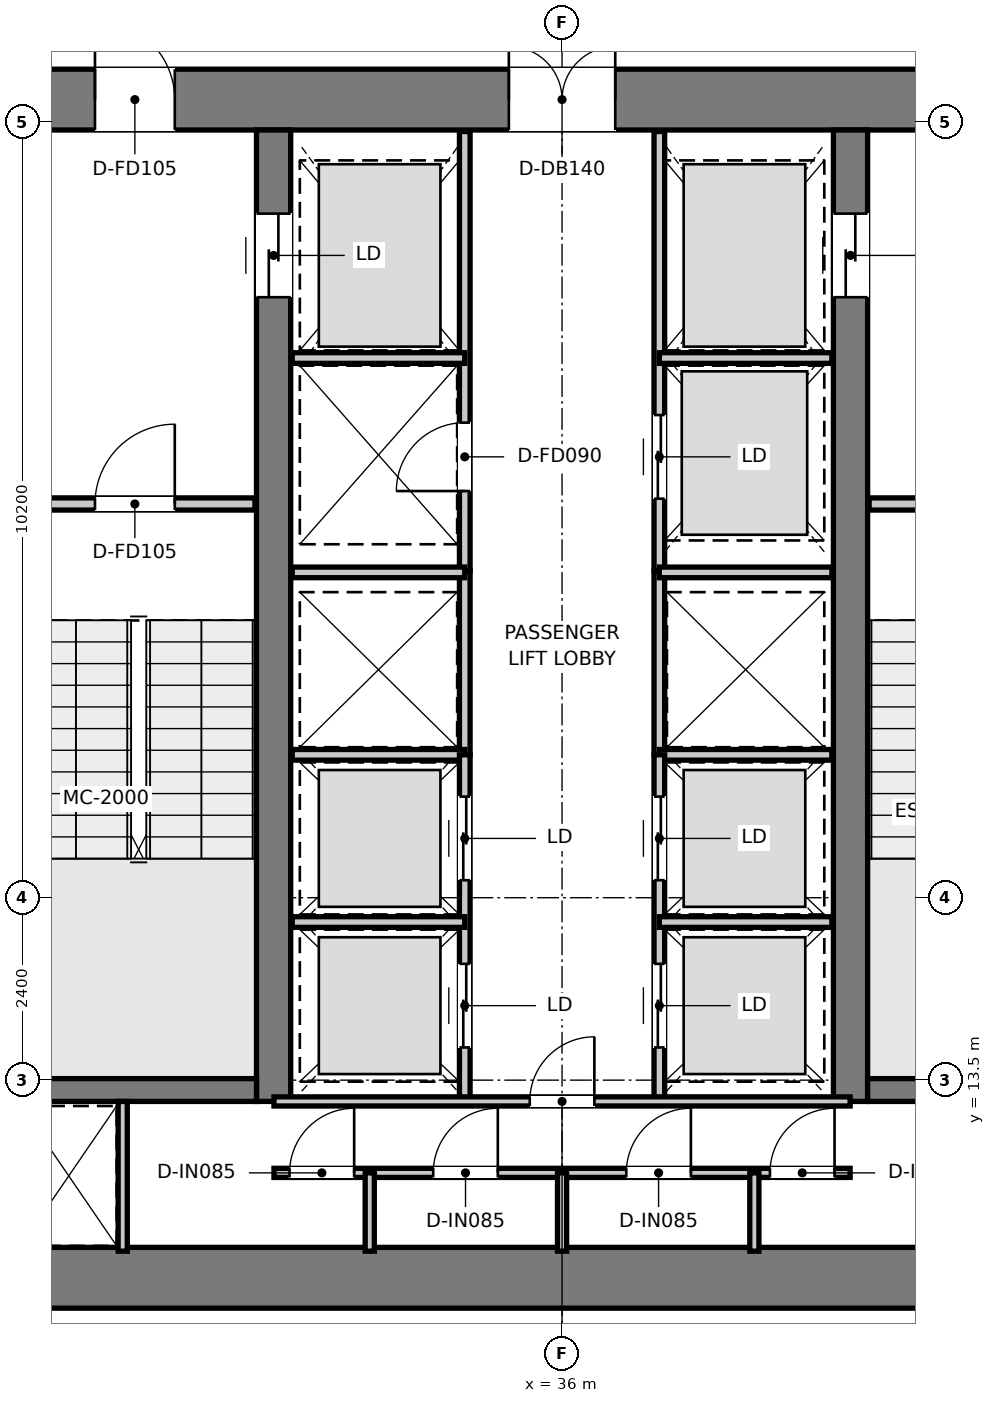
"""IFC4 building model, lengths in metres.
Left out: names, types, materials, properties, quantities, classifications, styles, units other than length and angle.
Written with IfcOpenShell. Run it as: python <this file> out.ifc"""

import sys

from ifc_helpers import new_model, si_unit, direction, frame, frame_2d, origin, place, context, subcontext, project, spatial, rectangle, extrude, element, fill, save


model = new_model("IFC4")
c1 = context("Model", 3, precision=1e-05, world=origin(), true_north=direction((0.0, 1.0)))
c2 = subcontext(c1, "Body", "Model", "MODEL_VIEW")
j1 = project(units=[si_unit("LENGTHUNIT", "METRE"), si_unit("PLANEANGLEUNIT", "RADIAN")], contexts=[c1])
p1 = place(None, origin())
s1 = spatial("IfcSite", under=j1, at=p1, CompositionType="ELEMENT")
p2 = place(p1, origin())
s2 = spatial("IfcBuilding", under=s1, at=p2, CompositionType="ELEMENT")
p3 = place(p2, frame((0.0, 0.0, 90.05)))
s3 = spatial("IfcBuildingStorey", under=s2, at=p3, CompositionType="ELEMENT", Elevation=90.05)
p4 = place(p3, frame((28.08, 10.9, 0.0), z_axis=(0.0, 0.0, 1.0), x_axis=(1.0, 0.0, 0.0)))
e1 = element("IfcWall", 1, at=p4, inside=s3, PredefinedType="SHEAR", context=c2, shape_type="SweptSolid", body=[
    extrude(rectangle(XDim=15.84, YDim=0.8, at=frame_2d((7.92, 0.0))), origin(), (0.0, 0.0, 1.0), 3.95),
])
p5 = place(p3, frame((28.08, 26.4, 0.0), z_axis=(0.0, 0.0, 1.0), x_axis=(1.0, 0.0, 0.0)))
e2 = element("IfcWall", 2, at=p5, inside=s3, PredefinedType="SHEAR", context=c2, shape_type="SweptSolid", body=[
    extrude(rectangle(XDim=15.84, YDim=0.8, at=frame_2d((7.92, 0.0))), origin(), (0.0, 0.0, 1.0), 3.95),
])
p6 = place(p5, frame((7.22, 0.0, 0.0)))
e3 = element("IfcOpeningElement", 3, at=p6, cuts=e2, PredefinedType="OPENING", context=c2, shape_type="SweptSolid", body=[
    extrude(rectangle(XDim=1.4, YDim=2.2, at=frame_2d((0.7, 1.1))), frame((0.0, 0.41, 0.0), z_axis=(0.0, -1.0, 0.0), x_axis=(1.0, 0.0, 0.0)), (0.0, 0.0, 1.0), 0.82),
])
p7 = place(p5, frame((1.775, 0.0, 0.0)))
e4 = element("IfcOpeningElement", 4, at=p7, cuts=e2, PredefinedType="OPENING", context=c2, shape_type="SweptSolid", body=[
    extrude(rectangle(XDim=1.05, YDim=2.1, at=frame_2d((0.525, 1.05))), frame((0.0, 0.41, 0.0), z_axis=(0.0, -1.0, 0.0), x_axis=(1.0, 0.0, 0.0)), (0.0, 0.0, 1.0), 0.82),
])
p8 = place(p5, frame((13.015, 0.0, 0.0)))
e5 = element("IfcOpeningElement", 5, at=p8, cuts=e2, PredefinedType="OPENING", context=c2, shape_type="SweptSolid", body=[
    extrude(rectangle(XDim=1.05, YDim=2.1, at=frame_2d((0.525, 1.05))), frame((0.0, 0.41, 0.0), z_axis=(0.0, -1.0, 0.0), x_axis=(1.0, 0.0, 0.0)), (0.0, 0.0, 1.0), 0.82),
])
p9 = place(p3, frame((32.205, 13.22, 0.0), z_axis=(0.0, 0.0, 1.0), x_axis=(0.0, 1.0, 0.0)))
e6 = element("IfcWall", 6, at=p9, inside=s3, PredefinedType="SHEAR", context=c2, shape_type="SweptSolid", body=[
    extrude(rectangle(XDim=12.78, YDim=0.45, at=frame_2d((6.39, 0.0))), origin(), (0.0, 0.0, 1.0), 3.95),
])
p10 = place(p9, frame((10.58, 0.0, 0.0)))
e7 = element("IfcOpeningElement", 7, at=p10, cuts=e6, PredefinedType="OPENING", context=c2, shape_type="SweptSolid", body=[
    extrude(rectangle(XDim=1.1, YDim=2.15, at=frame_2d((0.55, 1.075))), frame((0.0, 0.235, 0.0), z_axis=(0.0, -1.0, 0.0), x_axis=(1.0, 0.0, 0.0)), (0.0, 0.0, 1.0), 0.47),
])
p11 = place(p3, frame((39.795, 13.22, 0.0), z_axis=(0.0, 0.0, 1.0), x_axis=(0.0, 1.0, 0.0)))
e8 = element("IfcWall", 8, at=p11, inside=s3, PredefinedType="SHEAR", context=c2, shape_type="SweptSolid", body=[
    extrude(rectangle(XDim=12.78, YDim=0.45, at=frame_2d((6.39, 0.0))), origin(), (0.0, 0.0, 1.0), 3.95),
])
p12 = place(p11, frame((10.58, 0.0, 0.0)))
e9 = element("IfcOpeningElement", 9, at=p12, cuts=e8, PredefinedType="OPENING", context=c2, shape_type="SweptSolid", body=[
    extrude(rectangle(XDim=1.1, YDim=2.15, at=frame_2d((0.55, 1.075))), frame((0.0, 0.235, 0.0), z_axis=(0.0, -1.0, 0.0), x_axis=(1.0, 0.0, 0.0)), (0.0, 0.0, 1.0), 0.47),
])
for number, where, z_axis, x_axis in (
    (10, (28.88, 13.37, 0.0), (0.0, 0.0, 1.0), (1.0, 0.0, 0.0)),
    (11, (40.02, 13.37, 0.0), (0.0, 0.0, 1.0), (1.0, 0.0, 0.0)),
):
    element("IfcWall", number, at=place(p3, frame(where, z_axis=z_axis, x_axis=x_axis)), inside=s3, PredefinedType="SHEAR", context=c2, shape_type="SweptSolid", body=[
        extrude(rectangle(XDim=3.1, YDim=0.3, at=frame_2d((1.55, 0.0))), origin(), (0.0, 0.0, 1.0), 3.95),
    ])
p13 = place(p3, frame((28.8, 21.08, 0.0), z_axis=(0.0, 0.0, 1.0), x_axis=(1.0, 0.0, 0.0)))
e12 = element("IfcWall", 12, at=p13, inside=s3, PredefinedType="PARTITIONING", context=c2, shape_type="SweptSolid", body=[
    extrude(rectangle(XDim=3.16, YDim=0.16, at=frame_2d((1.58, 0.0))), origin(), (0.0, 0.0, 1.0), 3.67),
])
p14 = place(p13, frame((1.055, 0.0, 0.0)))
e13 = element("IfcOpeningElement", 13, at=p14, cuts=e12, PredefinedType="OPENING", context=c2, shape_type="SweptSolid", body=[
    extrude(rectangle(XDim=1.05, YDim=2.1, at=frame_2d((0.525, 1.05))), frame((0.0, 0.09, 0.0), z_axis=(0.0, -1.0, 0.0), x_axis=(1.0, 0.0, 0.0)), (0.0, 0.0, 1.0), 0.18),
])
p15 = place(p3, frame((40.04, 21.08, 0.0), z_axis=(0.0, 0.0, 1.0), x_axis=(1.0, 0.0, 0.0)))
e14 = element("IfcWall", 14, at=p15, inside=s3, PredefinedType="PARTITIONING", context=c2, shape_type="SweptSolid", body=[
    extrude(rectangle(XDim=3.16, YDim=0.16, at=frame_2d((1.58, 0.0))), origin(), (0.0, 0.0, 1.0), 3.67),
])
p16 = place(p15, frame((1.055, 0.0, 0.0)))
e15 = element("IfcOpeningElement", 15, at=p16, cuts=e14, PredefinedType="OPENING", context=c2, shape_type="SweptSolid", body=[
    extrude(rectangle(XDim=1.05, YDim=2.1, at=frame_2d((0.525, 1.05))), frame((0.0, 0.09, 0.0), z_axis=(0.0, -1.0, 0.0), x_axis=(1.0, 0.0, 0.0)), (0.0, 0.0, 1.0), 0.18),
])
p17 = place(p3, frame((34.72, 20.2, 0.0), z_axis=(0.0, 0.0, 1.0), x_axis=(0.0, 1.0, 0.0)))
e16 = element("IfcWall", 16, at=p17, inside=s3, PredefinedType="PARTITIONING", context=c2, shape_type="SweptSolid", body=[
    extrude(rectangle(XDim=5.78, YDim=0.14, at=frame_2d((2.89, 0.0))), origin(), (0.0, 0.0, 1.0), 2.47),
])
p18 = place(p17, frame((1.05, 0.0, 0.0)))
e17 = element("IfcOpeningElement", 17, at=p18, cuts=e16, PredefinedType="OPENING", context=c2, shape_type="SweptSolid", body=[
    extrude(rectangle(XDim=0.9, YDim=2.1, at=frame_2d((0.45, 1.05))), frame((0.0, 0.08, 0.0), z_axis=(0.0, -1.0, 0.0), x_axis=(1.0, 0.0, 0.0)), (0.0, 0.0, 1.0), 0.16),
])
p19 = place(p3, frame((37.28, 20.2, 0.0), z_axis=(0.0, 0.0, 1.0), x_axis=(0.0, 1.0, 0.0)))
e18 = element("IfcWall", 18, at=p19, inside=s3, PredefinedType="PARTITIONING", context=c2, shape_type="SweptSolid", body=[
    extrude(rectangle(XDim=5.78, YDim=0.14, at=frame_2d((2.89, 0.0))), origin(), (0.0, 0.0, 1.0), 2.47),
])
p20 = place(p19, frame((0.95, 0.0, 0.0)))
e19 = element("IfcOpeningElement", 19, at=p20, cuts=e18, PredefinedType="OPENING", context=c2, shape_type="SweptSolid", body=[
    extrude(rectangle(XDim=1.1, YDim=2.15, at=frame_2d((0.55, 1.075))), frame((0.0, 0.08, 0.0), z_axis=(0.0, -1.0, 0.0), x_axis=(1.0, 0.0, 0.0)), (0.0, 0.0, 1.0), 0.16),
])
for number, where, z_axis, x_axis in (
    (20, (32.45, 23.0, 0.0), (0.0, 0.0, 1.0), (1.0, 0.0, 0.0)),
    (21, (37.28, 23.0, 0.0), (0.0, 0.0, 1.0), (1.0, 0.0, 0.0)),
):
    element("IfcWall", number, at=place(p3, frame(where, z_axis=z_axis, x_axis=x_axis)), inside=s3, PredefinedType="PARTITIONING", context=c2, shape_type="SweptSolid", body=[
        extrude(rectangle(XDim=2.27, YDim=0.14, at=frame_2d((1.135, 0.0))), origin(), (0.0, 0.0, 1.0), 2.47),
    ])
for number, where, z_axis, x_axis in (
    (22, (34.72, 17.78, 0.0), (0.0, 0.0, 1.0), (0.0, 1.0, 0.0)),
    (23, (37.28, 17.78, 0.0), (0.0, 0.0, 1.0), (0.0, 1.0, 0.0)),
):
    element("IfcWall", number, at=place(p3, frame(where, z_axis=z_axis, x_axis=x_axis)), inside=s3, PredefinedType="PARTITIONING", context=c2, shape_type="SweptSolid", body=[
        extrude(rectangle(XDim=2.42, YDim=0.14, at=frame_2d((1.21, 0.0))), origin(), (0.0, 0.0, 1.0), 3.67),
    ])
for number, where, z_axis, x_axis in (
    (24, (32.45, 17.78, 0.0), (0.0, 0.0, 1.0), (1.0, 0.0, 0.0)),
    (25, (32.45, 20.18, 0.0), (0.0, 0.0, 1.0), (1.0, 0.0, 0.0)),
    (26, (37.28, 17.78, 0.0), (0.0, 0.0, 1.0), (1.0, 0.0, 0.0)),
    (27, (37.28, 20.18, 0.0), (0.0, 0.0, 1.0), (1.0, 0.0, 0.0)),
):
    element("IfcWall", number, at=place(p3, frame(where, z_axis=z_axis, x_axis=x_axis)), inside=s3, PredefinedType="PARTITIONING", context=c2, shape_type="SweptSolid", body=[
        extrude(rectangle(XDim=2.27, YDim=0.14, at=frame_2d((1.135, 0.0))), origin(), (0.0, 0.0, 1.0), 3.67),
    ])
p21 = place(p3, frame((34.72, 13.22, 0.0), z_axis=(0.0, 0.0, 1.0), x_axis=(0.0, 1.0, 0.0)))
e28 = element("IfcWall", 28, at=p21, inside=s3, PredefinedType="PARTITIONING", context=c2, shape_type="SweptSolid", body=[
    extrude(rectangle(XDim=4.56, YDim=0.14, at=frame_2d((2.28, 0.0))), origin(), (0.0, 0.0, 1.0), 3.67),
])
p22 = place(p21, frame((0.71, 0.0, 0.0)))
e29 = element("IfcOpeningElement", 29, at=p22, cuts=e28, PredefinedType="OPENING", context=c2, shape_type="SweptSolid", body=[
    extrude(rectangle(XDim=1.1, YDim=2.15, at=frame_2d((0.55, 1.075))), frame((0.0, 0.08, 0.0), z_axis=(0.0, -1.0, 0.0), x_axis=(1.0, 0.0, 0.0)), (0.0, 0.0, 1.0), 0.16),
])
p23 = place(p21, frame((2.91, 0.0, 0.0)))
e30 = element("IfcOpeningElement", 30, at=p23, cuts=e28, PredefinedType="OPENING", context=c2, shape_type="SweptSolid", body=[
    extrude(rectangle(XDim=1.1, YDim=2.15, at=frame_2d((0.55, 1.075))), frame((0.0, 0.08, 0.0), z_axis=(0.0, -1.0, 0.0), x_axis=(1.0, 0.0, 0.0)), (0.0, 0.0, 1.0), 0.16),
])
p24 = place(p3, frame((32.45, 15.58, 0.0), z_axis=(0.0, 0.0, 1.0), x_axis=(1.0, 0.0, 0.0)))
e31 = element("IfcWall", 31, at=p24, inside=s3, PredefinedType="PARTITIONING", context=c2, shape_type="SweptSolid", body=[
    extrude(rectangle(XDim=2.27, YDim=0.14, at=frame_2d((1.135, 0.0))), origin(), (0.0, 0.0, 1.0), 3.67),
])
p25 = place(p3, frame((37.28, 13.22, 0.0), z_axis=(0.0, 0.0, 1.0), x_axis=(0.0, 1.0, 0.0)))
e32 = element("IfcWall", 32, at=p25, inside=s3, PredefinedType="PARTITIONING", context=c2, shape_type="SweptSolid", body=[
    extrude(rectangle(XDim=4.56, YDim=0.14, at=frame_2d((2.28, 0.0))), origin(), (0.0, 0.0, 1.0), 3.67),
])
p26 = place(p25, frame((0.71, 0.0, 0.0)))
e33 = element("IfcOpeningElement", 33, at=p26, cuts=e32, PredefinedType="OPENING", context=c2, shape_type="SweptSolid", body=[
    extrude(rectangle(XDim=1.1, YDim=2.15, at=frame_2d((0.55, 1.075))), frame((0.0, 0.08, 0.0), z_axis=(0.0, -1.0, 0.0), x_axis=(1.0, 0.0, 0.0)), (0.0, 0.0, 1.0), 0.16),
])
p27 = place(p25, frame((2.91, 0.0, 0.0)))
e34 = element("IfcOpeningElement", 34, at=p27, cuts=e32, PredefinedType="OPENING", context=c2, shape_type="SweptSolid", body=[
    extrude(rectangle(XDim=1.1, YDim=2.15, at=frame_2d((0.55, 1.075))), frame((0.0, 0.08, 0.0), z_axis=(0.0, -1.0, 0.0), x_axis=(1.0, 0.0, 0.0)), (0.0, 0.0, 1.0), 0.16),
])
p28 = place(p3, frame((37.28, 15.58, 0.0), z_axis=(0.0, 0.0, 1.0), x_axis=(1.0, 0.0, 0.0)))
e35 = element("IfcWall", 35, at=p28, inside=s3, PredefinedType="PARTITIONING", context=c2, shape_type="SweptSolid", body=[
    extrude(rectangle(XDim=2.27, YDim=0.14, at=frame_2d((1.135, 0.0))), origin(), (0.0, 0.0, 1.0), 3.67),
])
p29 = place(p3, frame((30.22, 11.25, 0.0), z_axis=(0.0, 0.0, 1.0), x_axis=(0.0, 1.0, 0.0)))
e36 = element("IfcWall", 36, at=p29, inside=s3, PredefinedType="PARTITIONING", context=c2, shape_type="SweptSolid", body=[
    extrude(rectangle(XDim=1.97, YDim=0.12, at=frame_2d((0.985, 0.0))), origin(), (0.0, 0.0, 1.0), 3.67),
])
p30 = place(p3, frame((32.21, 13.22, 0.0), z_axis=(0.0, 0.0, 1.0), x_axis=(1.0, 0.0, 0.0)))
e37 = element("IfcWall", 37, at=p30, inside=s3, PredefinedType="PARTITIONING", context=c2, shape_type="SweptSolid", body=[
    extrude(rectangle(XDim=7.58, YDim=0.12, at=frame_2d((3.79, 0.0))), origin(), (0.0, 0.0, 1.0), 3.67),
])
p31 = place(p30, frame((3.365, 0.0, 0.0)))
e38 = element("IfcOpeningElement", 38, at=p31, cuts=e37, PredefinedType="OPENING", context=c2, shape_type="SweptSolid", body=[
    extrude(rectangle(XDim=0.85, YDim=2.1, at=frame_2d((0.425, 1.05))), frame((0.0, 0.07, 0.0), z_axis=(0.0, -1.0, 0.0), x_axis=(1.0, 0.0, 0.0)), (0.0, 0.0, 1.0), 0.14),
])
p32 = place(p3, frame((32.21, 12.28, 0.0), z_axis=(0.0, 0.0, 1.0), x_axis=(1.0, 0.0, 0.0)))
e39 = element("IfcWall", 39, at=p32, inside=s3, PredefinedType="PARTITIONING", context=c2, shape_type="SweptSolid", body=[
    extrude(rectangle(XDim=7.58, YDim=0.12, at=frame_2d((3.79, 0.0))), origin(), (0.0, 0.0, 1.0), 3.67),
])
p33 = place(p32, frame((0.205, 0.0, 0.0)))
e40 = element("IfcOpeningElement", 40, at=p33, cuts=e39, PredefinedType="OPENING", context=c2, shape_type="SweptSolid", body=[
    extrude(rectangle(XDim=0.85, YDim=2.1, at=frame_2d((0.425, 1.05))), frame((0.0, 0.07, 0.0), z_axis=(0.0, -1.0, 0.0), x_axis=(1.0, 0.0, 0.0)), (0.0, 0.0, 1.0), 0.14),
])
p34 = place(p32, frame((2.095, 0.0, 0.0)))
e41 = element("IfcOpeningElement", 41, at=p34, cuts=e39, PredefinedType="OPENING", context=c2, shape_type="SweptSolid", body=[
    extrude(rectangle(XDim=0.85, YDim=2.1, at=frame_2d((0.425, 1.05))), frame((0.0, 0.07, 0.0), z_axis=(0.0, -1.0, 0.0), x_axis=(1.0, 0.0, 0.0)), (0.0, 0.0, 1.0), 0.14),
])
p35 = place(p32, frame((4.635, 0.0, 0.0)))
e42 = element("IfcOpeningElement", 42, at=p35, cuts=e39, PredefinedType="OPENING", context=c2, shape_type="SweptSolid", body=[
    extrude(rectangle(XDim=0.85, YDim=2.1, at=frame_2d((0.425, 1.05))), frame((0.0, 0.07, 0.0), z_axis=(0.0, -1.0, 0.0), x_axis=(1.0, 0.0, 0.0)), (0.0, 0.0, 1.0), 0.14),
])
p36 = place(p32, frame((6.525, 0.0, 0.0)))
e43 = element("IfcOpeningElement", 43, at=p36, cuts=e39, PredefinedType="OPENING", context=c2, shape_type="SweptSolid", body=[
    extrude(rectangle(XDim=0.85, YDim=2.1, at=frame_2d((0.425, 1.05))), frame((0.0, 0.07, 0.0), z_axis=(0.0, -1.0, 0.0), x_axis=(1.0, 0.0, 0.0)), (0.0, 0.0, 1.0), 0.14),
])
for number, where, z_axis, x_axis in (
    (44, (33.47, 11.25, 0.0), (0.0, 0.0, 1.0), (0.0, 1.0, 0.0)),
    (45, (36.0, 11.25, 0.0), (0.0, 0.0, 1.0), (0.0, 1.0, 0.0)),
    (46, (38.53, 11.25, 0.0), (0.0, 0.0, 1.0), (0.0, 1.0, 0.0)),
):
    element("IfcWall", number, at=place(p3, frame(where, z_axis=z_axis, x_axis=x_axis)), inside=s3, PredefinedType="PARTITIONING", context=c2, shape_type="SweptSolid", body=[
        extrude(rectangle(XDim=1.03, YDim=0.12, at=frame_2d((0.515, 0.0))), origin(), (0.0, 0.0, 1.0), 3.67),
    ])
p37 = place(p14, origin())
e47 = element("IfcDoor", 47, at=p37, inside=s3, OperationType="SINGLE_SWING_RIGHT", PredefinedType="DOOR", context=c2, shape_type="SweptSolid", body=[
    extrude(rectangle(XDim=1.05, YDim=2.1, at=frame_2d((0.525, 1.05))), frame((0.0, 0.025, 0.0), z_axis=(0.0, -1.0, 0.0), x_axis=(1.0, 0.0, 0.0)), (0.0, 0.0, 1.0), 0.05),
])
fill(e13, e47)
p38 = place(p6, origin())
e48 = element("IfcDoor", 48, at=p38, inside=s3, OperationType="DOUBLE_DOOR_SINGLE_SWING", PredefinedType="DOOR", context=c2, shape_type="SweptSolid", body=[
    extrude(rectangle(XDim=1.4, YDim=2.2, at=frame_2d((0.7, 1.1))), frame((0.0, 0.025, 0.0), z_axis=(0.0, -1.0, 0.0), x_axis=(1.0, 0.0, 0.0)), (0.0, 0.0, 1.0), 0.05),
])
fill(e3, e48)
p39 = place(p7, origin())
e49 = element("IfcDoor", 49, at=p39, inside=s3, OperationType="SINGLE_SWING_LEFT", PredefinedType="DOOR", context=c2, shape_type="SweptSolid", body=[
    extrude(rectangle(XDim=1.05, YDim=2.1, at=frame_2d((0.525, 1.05))), frame((0.0, 0.025, 0.0), z_axis=(0.0, -1.0, 0.0), x_axis=(1.0, 0.0, 0.0)), (0.0, 0.0, 1.0), 0.05),
])
fill(e4, e49)
p40 = place(p10, origin())
e50 = element("IfcDoor", 50, at=p40, inside=s3, OperationType="DOUBLE_DOOR_SLIDING", PredefinedType="DOOR", context=c2, shape_type="SweptSolid", body=[
    extrude(rectangle(XDim=1.1, YDim=2.15, at=frame_2d((0.55, 1.075))), frame((0.0, 0.025, 0.0), z_axis=(0.0, -1.0, 0.0), x_axis=(1.0, 0.0, 0.0)), (0.0, 0.0, 1.0), 0.05),
])
fill(e7, e50)
p41 = place(p12, origin())
e51 = element("IfcDoor", 51, at=p41, inside=s3, OperationType="DOUBLE_DOOR_SLIDING", PredefinedType="DOOR", context=c2, shape_type="SweptSolid", body=[
    extrude(rectangle(XDim=1.1, YDim=2.15, at=frame_2d((0.55, 1.075))), frame((0.0, 0.025, 0.0), z_axis=(0.0, -1.0, 0.0), x_axis=(1.0, 0.0, 0.0)), (0.0, 0.0, 1.0), 0.05),
])
fill(e9, e51)
p42 = place(p18, origin())
e52 = element("IfcDoor", 52, at=p42, inside=s3, OperationType="SINGLE_SWING_LEFT", PredefinedType="DOOR", context=c2, shape_type="SweptSolid", body=[
    extrude(rectangle(XDim=0.9, YDim=2.1, at=frame_2d((0.45, 1.05))), frame((0.0, 0.025, 0.0), z_axis=(0.0, -1.0, 0.0), x_axis=(1.0, 0.0, 0.0)), (0.0, 0.0, 1.0), 0.05),
])
fill(e17, e52)
p43 = place(p20, origin())
e53 = element("IfcDoor", 53, at=p43, inside=s3, OperationType="DOUBLE_DOOR_SLIDING", PredefinedType="DOOR", context=c2, shape_type="SweptSolid", body=[
    extrude(rectangle(XDim=1.1, YDim=2.15, at=frame_2d((0.55, 1.075))), frame((0.0, 0.025, 0.0), z_axis=(0.0, -1.0, 0.0), x_axis=(1.0, 0.0, 0.0)), (0.0, 0.0, 1.0), 0.05),
])
fill(e19, e53)
p44 = place(p22, origin())
e54 = element("IfcDoor", 54, at=p44, inside=s3, OperationType="DOUBLE_DOOR_SLIDING", PredefinedType="DOOR", context=c2, shape_type="SweptSolid", body=[
    extrude(rectangle(XDim=1.1, YDim=2.15, at=frame_2d((0.55, 1.075))), frame((0.0, 0.025, 0.0), z_axis=(0.0, -1.0, 0.0), x_axis=(1.0, 0.0, 0.0)), (0.0, 0.0, 1.0), 0.05),
])
fill(e29, e54)
p45 = place(p23, origin())
e55 = element("IfcDoor", 55, at=p45, inside=s3, OperationType="DOUBLE_DOOR_SLIDING", PredefinedType="DOOR", context=c2, shape_type="SweptSolid", body=[
    extrude(rectangle(XDim=1.1, YDim=2.15, at=frame_2d((0.55, 1.075))), frame((0.0, 0.025, 0.0), z_axis=(0.0, -1.0, 0.0), x_axis=(1.0, 0.0, 0.0)), (0.0, 0.0, 1.0), 0.05),
])
fill(e30, e55)
p46 = place(p26, origin())
e56 = element("IfcDoor", 56, at=p46, inside=s3, OperationType="DOUBLE_DOOR_SLIDING", PredefinedType="DOOR", context=c2, shape_type="SweptSolid", body=[
    extrude(rectangle(XDim=1.1, YDim=2.15, at=frame_2d((0.55, 1.075))), frame((0.0, 0.025, 0.0), z_axis=(0.0, -1.0, 0.0), x_axis=(1.0, 0.0, 0.0)), (0.0, 0.0, 1.0), 0.05),
])
fill(e33, e56)
p47 = place(p27, origin())
e57 = element("IfcDoor", 57, at=p47, inside=s3, OperationType="DOUBLE_DOOR_SLIDING", PredefinedType="DOOR", context=c2, shape_type="SweptSolid", body=[
    extrude(rectangle(XDim=1.1, YDim=2.15, at=frame_2d((0.55, 1.075))), frame((0.0, 0.025, 0.0), z_axis=(0.0, -1.0, 0.0), x_axis=(1.0, 0.0, 0.0)), (0.0, 0.0, 1.0), 0.05),
])
fill(e34, e57)
p48 = place(p31, origin())
e58 = element("IfcDoor", 58, at=p48, inside=s3, OperationType="SINGLE_SWING_RIGHT", PredefinedType="DOOR", context=c2, shape_type="SweptSolid", body=[
    extrude(rectangle(XDim=0.85, YDim=2.1, at=frame_2d((0.425, 1.05))), frame((0.0, 0.025, 0.0), z_axis=(0.0, -1.0, 0.0), x_axis=(1.0, 0.0, 0.0)), (0.0, 0.0, 1.0), 0.05),
])
fill(e38, e58)
p49 = place(p33, origin())
e59 = element("IfcDoor", 59, at=p49, inside=s3, OperationType="SINGLE_SWING_RIGHT", PredefinedType="DOOR", context=c2, shape_type="SweptSolid", body=[
    extrude(rectangle(XDim=0.85, YDim=2.1, at=frame_2d((0.425, 1.05))), frame((0.0, 0.025, 0.0), z_axis=(0.0, -1.0, 0.0), x_axis=(1.0, 0.0, 0.0)), (0.0, 0.0, 1.0), 0.05),
])
fill(e40, e59)
p50 = place(p34, origin())
e60 = element("IfcDoor", 60, at=p50, inside=s3, OperationType="SINGLE_SWING_RIGHT", PredefinedType="DOOR", context=c2, shape_type="SweptSolid", body=[
    extrude(rectangle(XDim=0.85, YDim=2.1, at=frame_2d((0.425, 1.05))), frame((0.0, 0.025, 0.0), z_axis=(0.0, -1.0, 0.0), x_axis=(1.0, 0.0, 0.0)), (0.0, 0.0, 1.0), 0.05),
])
fill(e41, e60)
p51 = place(p35, origin())
e61 = element("IfcDoor", 61, at=p51, inside=s3, OperationType="SINGLE_SWING_RIGHT", PredefinedType="DOOR", context=c2, shape_type="SweptSolid", body=[
    extrude(rectangle(XDim=0.85, YDim=2.1, at=frame_2d((0.425, 1.05))), frame((0.0, 0.025, 0.0), z_axis=(0.0, -1.0, 0.0), x_axis=(1.0, 0.0, 0.0)), (0.0, 0.0, 1.0), 0.05),
])
fill(e42, e61)
p52 = place(p36, origin())
e62 = element("IfcDoor", 62, at=p52, inside=s3, OperationType="SINGLE_SWING_RIGHT", PredefinedType="DOOR", context=c2, shape_type="SweptSolid", body=[
    extrude(rectangle(XDim=0.85, YDim=2.1, at=frame_2d((0.425, 1.05))), frame((0.0, 0.025, 0.0), z_axis=(0.0, -1.0, 0.0), x_axis=(1.0, 0.0, 0.0)), (0.0, 0.0, 1.0), 0.05),
])
fill(e43, e62)
save(model, sys.argv[1])
